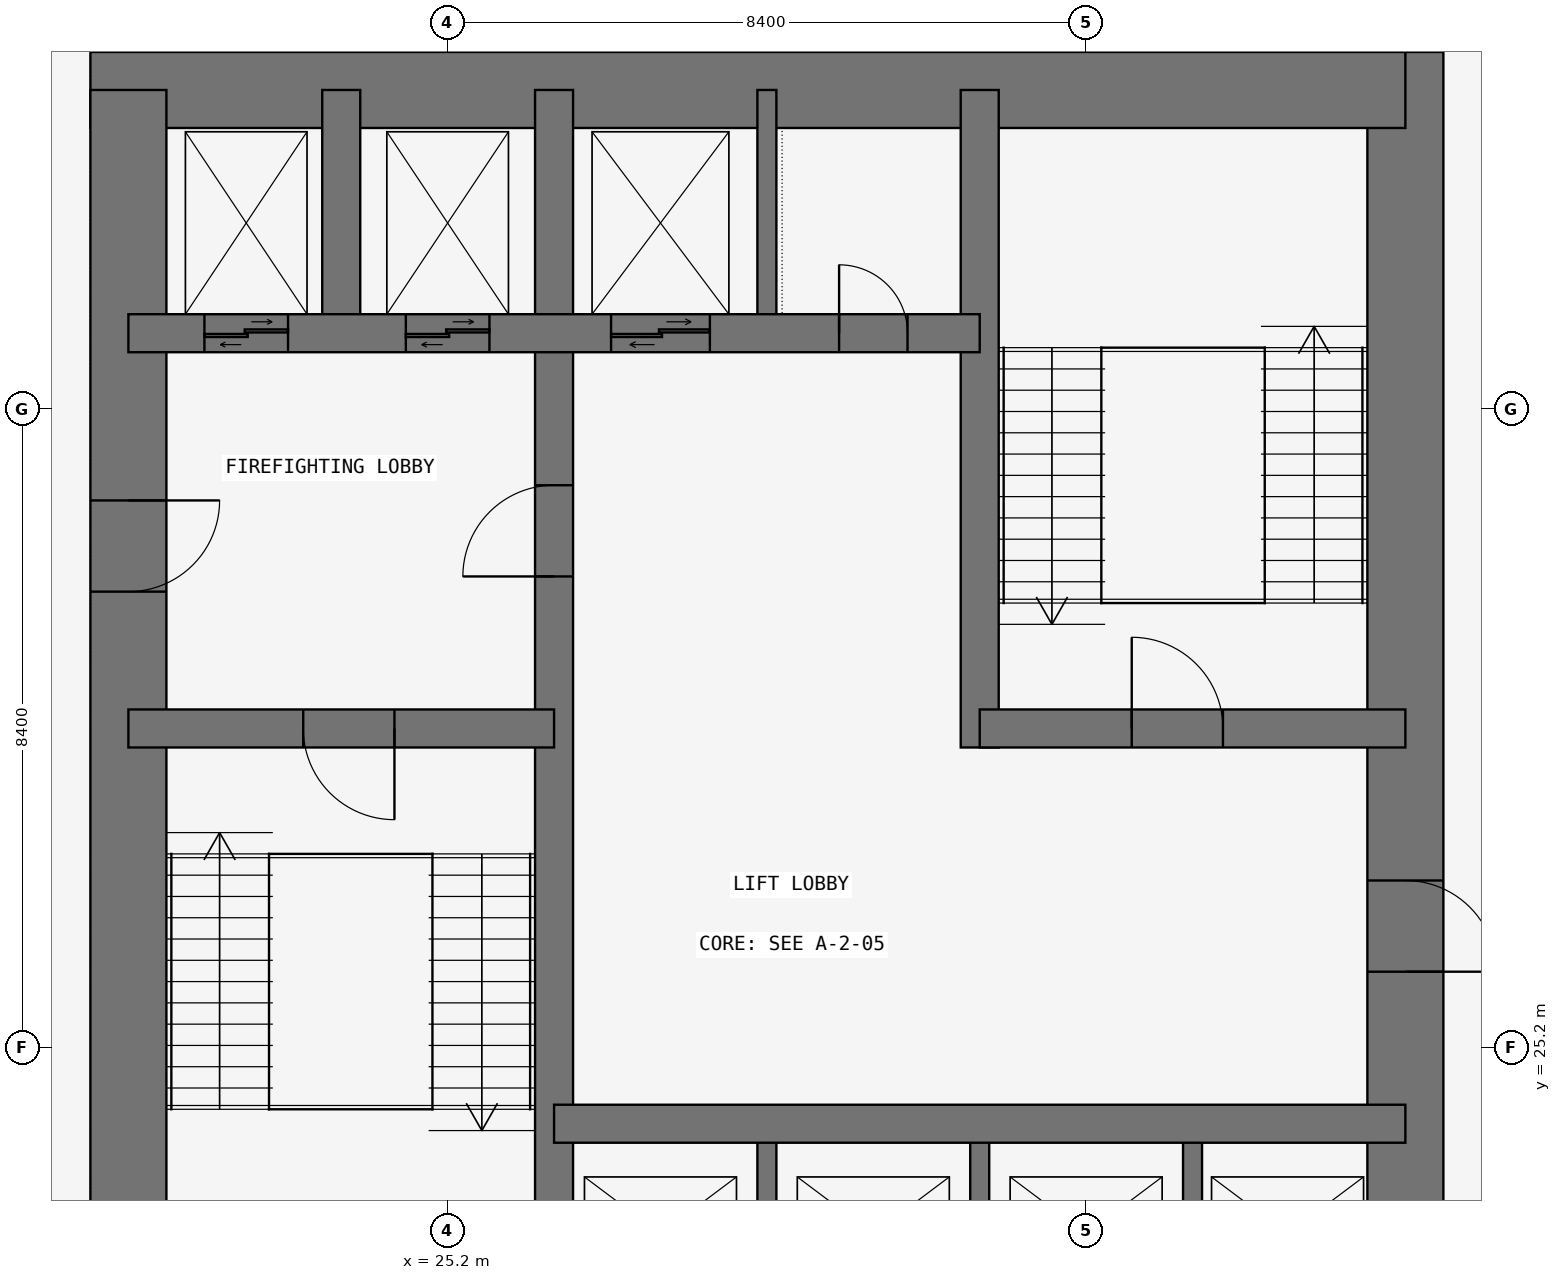
"""IFC4 building model, lengths in metres.
Left out: names, types, materials, properties, quantities, classifications, styles, units other than length and angle.
Written with IfcOpenShell. Run it as: python <this file> out.ifc"""

import sys

from ifc_helpers import new_model, si_unit, direction, frame, frame_2d, origin, place, context, subcontext, project, spatial, rectangle, extrude, element, fill, save


model = new_model("IFC4")
c1 = context("Model", 3, precision=1e-05, world=origin(), true_north=direction((0.0, 1.0)))
c2 = subcontext(c1, "Body", "Model", "MODEL_VIEW")
j1 = project(units=[si_unit("LENGTHUNIT", "METRE"), si_unit("PLANEANGLEUNIT", "RADIAN")], contexts=[c1])
p1 = place(None, origin())
s1 = spatial("IfcSite", under=j1, at=p1, CompositionType="ELEMENT")
p2 = place(p1, origin())
s2 = spatial("IfcBuilding", under=s1, at=p2, CompositionType="ELEMENT")
p3 = place(p2, frame((0.0, 0.0, 10.5)))
s3 = spatial("IfcBuildingStorey", under=s2, at=p3, CompositionType="ELEMENT", Elevation=10.5)
p4 = place(p3, frame((37.8, 21.0, 0.0), z_axis=(0.0, 0.0, 1.0), x_axis=(0.0, 1.0, 0.0)))
e1 = element("IfcWall", 1, at=p4, inside=s3, PredefinedType="SHEAR", context=c2, shape_type="SweptSolid", body=[
    extrude(rectangle(XDim=17.3, YDim=1.0, at=frame_2d((8.65, 0.0))), origin(), (0.0, 0.0, 1.0), 4.5),
])
p5 = place(p4, frame((5.2, 0.0, 0.0)))
e2 = element("IfcOpeningElement", 2, at=p5, cuts=e1, PredefinedType="OPENING", context=c2, shape_type="SweptSolid", body=[
    extrude(rectangle(XDim=1.2, YDim=2.1, at=frame_2d((0.6, 1.05))), frame((0.0, 0.51, 0.0), z_axis=(0.0, -1.0, 0.0), x_axis=(1.0, 0.0, 0.0)), (0.0, 0.0, 1.0), 1.02),
])
p6 = place(p3, frame((37.8, 37.8, 0.0), z_axis=(0.0, 0.0, 1.0), x_axis=(-1.0, 0.0, 0.0)))
e3 = element("IfcWall", 3, at=p6, inside=s3, PredefinedType="SHEAR", context=c2, shape_type="SweptSolid", body=[
    extrude(rectangle(XDim=17.3, YDim=1.0, at=frame_2d((8.65, 0.0))), origin(), (0.0, 0.0, 1.0), 4.5),
])
p7 = place(p3, frame((21.0, 37.8, 0.0), z_axis=(0.0, 0.0, 1.0), x_axis=(0.0, -1.0, 0.0)))
e4 = element("IfcWall", 4, at=p7, inside=s3, PredefinedType="SHEAR", context=c2, shape_type="SweptSolid", body=[
    extrude(rectangle(XDim=17.3, YDim=1.0, at=frame_2d((8.65, 0.0))), origin(), (0.0, 0.0, 1.0), 4.5),
])
p8 = place(p7, frame((5.4, 0.0, 0.0)))
e5 = element("IfcOpeningElement", 5, at=p8, cuts=e4, PredefinedType="OPENING", context=c2, shape_type="SweptSolid", body=[
    extrude(rectangle(XDim=1.2, YDim=2.1, at=frame_2d((0.6, 1.05))), frame((0.0, 0.51, 0.0), z_axis=(0.0, -1.0, 0.0), x_axis=(1.0, 0.0, 0.0)), (0.0, 0.0, 1.0), 1.02),
])
p9 = place(p3, frame((26.6, 21.0, 0.0), z_axis=(0.0, 0.0, 1.0), x_axis=(0.0, 1.0, 0.0)))
e6 = element("IfcWall", 6, at=p9, inside=s3, PredefinedType="SHEAR", context=c2, shape_type="SweptSolid", body=[
    extrude(rectangle(XDim=16.8, YDim=0.5, at=frame_2d((8.4, 0.0))), origin(), (0.0, 0.0, 1.0), 4.5),
])
p10 = place(p9, frame((10.4, 0.0, 0.0)))
e7 = element("IfcOpeningElement", 7, at=p10, cuts=e6, PredefinedType="OPENING", context=c2, shape_type="SweptSolid", body=[
    extrude(rectangle(XDim=1.2, YDim=2.1, at=frame_2d((0.6, 1.05))), frame((0.0, 0.26, 0.0), z_axis=(0.0, -1.0, 0.0), x_axis=(1.0, 0.0, 0.0)), (0.0, 0.0, 1.0), 0.52),
])
p11 = place(p3, frame((21.0, 29.4, 0.0), z_axis=(0.0, 0.0, 1.0), x_axis=(1.0, 0.0, 0.0)))
e8 = element("IfcWall", 8, at=p11, inside=s3, PredefinedType="SHEAR", context=c2, shape_type="SweptSolid", body=[
    extrude(rectangle(XDim=5.6, YDim=0.5, at=frame_2d((2.8, 0.0))), origin(), (0.0, 0.0, 1.0), 4.5),
])
p12 = place(p11, frame((2.3, 0.0, 0.0)))
e9 = element("IfcOpeningElement", 9, at=p12, cuts=e8, PredefinedType="OPENING", context=c2, shape_type="SweptSolid", body=[
    extrude(rectangle(XDim=1.2, YDim=2.1, at=frame_2d((0.6, 1.05))), frame((0.0, 0.26, 0.0), z_axis=(0.0, -1.0, 0.0), x_axis=(1.0, 0.0, 0.0)), (0.0, 0.0, 1.0), 0.52),
])
p13 = place(p3, frame((21.0, 34.6, 0.0), z_axis=(0.0, 0.0, 1.0), x_axis=(1.0, 0.0, 0.0)))
e10 = element("IfcWall", 10, at=p13, inside=s3, PredefinedType="SHEAR", context=c2, shape_type="SweptSolid", body=[
    extrude(rectangle(XDim=11.2, YDim=0.5, at=frame_2d((5.6, 0.0))), origin(), (0.0, 0.0, 1.0), 4.5),
])
p14 = place(p13, frame((9.35, 0.0, 0.0)))
e11 = element("IfcOpeningElement", 11, at=p14, cuts=e10, PredefinedType="OPENING", context=c2, shape_type="SweptSolid", body=[
    extrude(rectangle(XDim=0.9, YDim=2.1, at=frame_2d((0.45, 1.05))), frame((0.0, 0.26, 0.0), z_axis=(0.0, -1.0, 0.0), x_axis=(1.0, 0.0, 0.0)), (0.0, 0.0, 1.0), 0.52),
])
p15 = place(p13, frame((1.0, 0.0, 0.0)))
e12 = element("IfcOpeningElement", 12, at=p15, cuts=e10, PredefinedType="OPENING", context=c2, shape_type="SweptSolid", body=[
    extrude(rectangle(XDim=1.1, YDim=2.1, at=frame_2d((0.55, 1.05))), frame((0.0, 0.26, 0.0), z_axis=(0.0, -1.0, 0.0), x_axis=(1.0, 0.0, 0.0)), (0.0, 0.0, 1.0), 0.52),
])
p16 = place(p13, frame((3.65, 0.0, 0.0)))
e13 = element("IfcOpeningElement", 13, at=p16, cuts=e10, PredefinedType="OPENING", context=c2, shape_type="SweptSolid", body=[
    extrude(rectangle(XDim=1.1, YDim=2.1, at=frame_2d((0.55, 1.05))), frame((0.0, 0.26, 0.0), z_axis=(0.0, -1.0, 0.0), x_axis=(1.0, 0.0, 0.0)), (0.0, 0.0, 1.0), 0.52),
])
p17 = place(p13, frame((6.35, 0.0, 0.0)))
e14 = element("IfcOpeningElement", 14, at=p17, cuts=e10, PredefinedType="OPENING", context=c2, shape_type="SweptSolid", body=[
    extrude(rectangle(XDim=1.3, YDim=2.1, at=frame_2d((0.65, 1.05))), frame((0.0, 0.26, 0.0), z_axis=(0.0, -1.0, 0.0), x_axis=(1.0, 0.0, 0.0)), (0.0, 0.0, 1.0), 0.52),
])
p18 = place(p3, frame((23.8, 34.6, 0.0), z_axis=(0.0, 0.0, 1.0), x_axis=(0.0, 1.0, 0.0)))
e15 = element("IfcWall", 15, at=p18, inside=s3, PredefinedType="SHEAR", context=c2, shape_type="SweptSolid", body=[
    extrude(rectangle(XDim=3.2, YDim=0.5, at=frame_2d((1.6, 0.0))), origin(), (0.0, 0.0, 1.0), 4.5),
])
p19 = place(p3, frame((26.6, 24.2, 0.0), z_axis=(0.0, 0.0, 1.0), x_axis=(1.0, 0.0, 0.0)))
e16 = element("IfcWall", 16, at=p19, inside=s3, PredefinedType="SHEAR", context=c2, shape_type="SweptSolid", body=[
    extrude(rectangle(XDim=11.2, YDim=0.5, at=frame_2d((5.6, 0.0))), origin(), (0.0, 0.0, 1.0), 4.5),
])
p20 = place(p3, frame((32.2, 29.15, 0.0), z_axis=(0.0, 0.0, 1.0), x_axis=(0.0, 1.0, 0.0)))
e17 = element("IfcWall", 17, at=p20, inside=s3, PredefinedType="SHEAR", context=c2, shape_type="SweptSolid", body=[
    extrude(rectangle(XDim=8.65, YDim=0.5, at=frame_2d((4.325, 0.0))), origin(), (0.0, 0.0, 1.0), 4.5),
])
p21 = place(p3, frame((32.2, 29.4, 0.0), z_axis=(0.0, 0.0, 1.0), x_axis=(1.0, 0.0, 0.0)))
e18 = element("IfcWall", 18, at=p21, inside=s3, PredefinedType="SHEAR", context=c2, shape_type="SweptSolid", body=[
    extrude(rectangle(XDim=5.6, YDim=0.5, at=frame_2d((2.8, 0.0))), origin(), (0.0, 0.0, 1.0), 4.5),
])
p22 = place(p21, frame((2.0, 0.0, 0.0)))
e19 = element("IfcOpeningElement", 19, at=p22, cuts=e18, PredefinedType="OPENING", context=c2, shape_type="SweptSolid", body=[
    extrude(rectangle(XDim=1.2, YDim=2.1, at=frame_2d((0.6, 1.05))), frame((0.0, 0.26, 0.0), z_axis=(0.0, -1.0, 0.0), x_axis=(1.0, 0.0, 0.0)), (0.0, 0.0, 1.0), 0.52),
])
for number, where, z_axis, x_axis in (
    (20, (29.4, 21.0, 0.0), (0.0, 0.0, 1.0), (0.0, 1.0, 0.0)),
    (21, (32.2, 21.0, 0.0), (0.0, 0.0, 1.0), (0.0, 1.0, 0.0)),
    (22, (35.0, 21.0, 0.0), (0.0, 0.0, 1.0), (0.0, 1.0, 0.0)),
    (23, (29.4, 34.6, 0.0), (0.0, 0.0, 1.0), (0.0, 1.0, 0.0)),
):
    element("IfcWall", number, at=place(p3, frame(where, z_axis=z_axis, x_axis=x_axis)), inside=s3, PredefinedType="SHEAR", context=c2, shape_type="SweptSolid", body=[
        extrude(rectangle(XDim=3.2, YDim=0.25, at=frame_2d((1.6, 0.0))), origin(), (0.0, 0.0, 1.0), 4.5),
    ])
p23 = place(p8, origin())
e24 = element("IfcDoor", 24, at=p23, inside=s3, OperationType="SINGLE_SWING_LEFT", PredefinedType="DOOR", context=c2, shape_type="SweptSolid", body=[
    extrude(rectangle(XDim=1.2, YDim=2.1, at=frame_2d((0.6, 1.05))), frame((0.0, 0.025, 0.0), z_axis=(0.0, -1.0, 0.0), x_axis=(1.0, 0.0, 0.0)), (0.0, 0.0, 1.0), 0.05),
])
fill(e5, e24)
p24 = place(p12, frame((1.2, 0.0, 0.0), z_axis=(0.0, 0.0, 1.0), x_axis=(-1.0, 0.0, 0.0)))
e25 = element("IfcDoor", 25, at=p24, inside=s3, OperationType="SINGLE_SWING_LEFT", PredefinedType="DOOR", context=c2, shape_type="SweptSolid", body=[
    extrude(rectangle(XDim=1.2, YDim=2.1, at=frame_2d((0.6, 1.05))), frame((0.0, 0.025, 0.0), z_axis=(0.0, -1.0, 0.0), x_axis=(1.0, 0.0, 0.0)), (0.0, 0.0, 1.0), 0.05),
])
fill(e9, e25)
p25 = place(p10, origin())
e26 = element("IfcDoor", 26, at=p25, inside=s3, OperationType="SINGLE_SWING_LEFT", PredefinedType="DOOR", context=c2, shape_type="SweptSolid", body=[
    extrude(rectangle(XDim=1.2, YDim=2.1, at=frame_2d((0.6, 1.05))), frame((0.0, 0.025, 0.0), z_axis=(0.0, -1.0, 0.0), x_axis=(1.0, 0.0, 0.0)), (0.0, 0.0, 1.0), 0.05),
])
fill(e7, e26)
p26 = place(p5, frame((1.2, 0.0, 0.0), z_axis=(0.0, 0.0, 1.0), x_axis=(-1.0, 0.0, 0.0)))
e27 = element("IfcDoor", 27, at=p26, inside=s3, OperationType="SINGLE_SWING_RIGHT", PredefinedType="DOOR", context=c2, shape_type="SweptSolid", body=[
    extrude(rectangle(XDim=1.2, YDim=2.1, at=frame_2d((0.6, 1.05))), frame((0.0, 0.025, 0.0), z_axis=(0.0, -1.0, 0.0), x_axis=(1.0, 0.0, 0.0)), (0.0, 0.0, 1.0), 0.05),
])
fill(e2, e27)
p27 = place(p22, origin())
e28 = element("IfcDoor", 28, at=p27, inside=s3, OperationType="SINGLE_SWING_LEFT", PredefinedType="DOOR", context=c2, shape_type="SweptSolid", body=[
    extrude(rectangle(XDim=1.2, YDim=2.1, at=frame_2d((0.6, 1.05))), frame((0.0, 0.025, 0.0), z_axis=(0.0, -1.0, 0.0), x_axis=(1.0, 0.0, 0.0)), (0.0, 0.0, 1.0), 0.05),
])
fill(e19, e28)
p28 = place(p14, origin())
e29 = element("IfcDoor", 29, at=p28, inside=s3, OperationType="SINGLE_SWING_LEFT", PredefinedType="DOOR", context=c2, shape_type="SweptSolid", body=[
    extrude(rectangle(XDim=0.9, YDim=2.1, at=frame_2d((0.45, 1.05))), frame((0.0, 0.025, 0.0), z_axis=(0.0, -1.0, 0.0), x_axis=(1.0, 0.0, 0.0)), (0.0, 0.0, 1.0), 0.05),
])
fill(e11, e29)
p29 = place(p15, origin())
e30 = element("IfcDoor", 30, at=p29, inside=s3, OperationType="DOUBLE_DOOR_SLIDING", PredefinedType="DOOR", context=c2, shape_type="SweptSolid", body=[
    extrude(rectangle(XDim=1.1, YDim=2.1, at=frame_2d((0.55, 1.05))), frame((0.0, 0.025, 0.0), z_axis=(0.0, -1.0, 0.0), x_axis=(1.0, 0.0, 0.0)), (0.0, 0.0, 1.0), 0.05),
])
fill(e12, e30)
p30 = place(p16, origin())
e31 = element("IfcDoor", 31, at=p30, inside=s3, OperationType="DOUBLE_DOOR_SLIDING", PredefinedType="DOOR", context=c2, shape_type="SweptSolid", body=[
    extrude(rectangle(XDim=1.1, YDim=2.1, at=frame_2d((0.55, 1.05))), frame((0.0, 0.025, 0.0), z_axis=(0.0, -1.0, 0.0), x_axis=(1.0, 0.0, 0.0)), (0.0, 0.0, 1.0), 0.05),
])
fill(e13, e31)
p31 = place(p17, origin())
e32 = element("IfcDoor", 32, at=p31, inside=s3, OperationType="DOUBLE_DOOR_SLIDING", PredefinedType="DOOR", context=c2, shape_type="SweptSolid", body=[
    extrude(rectangle(XDim=1.3, YDim=2.1, at=frame_2d((0.65, 1.05))), frame((0.0, 0.025, 0.0), z_axis=(0.0, -1.0, 0.0), x_axis=(1.0, 0.0, 0.0)), (0.0, 0.0, 1.0), 0.05),
])
fill(e14, e32)
save(model, sys.argv[1])
